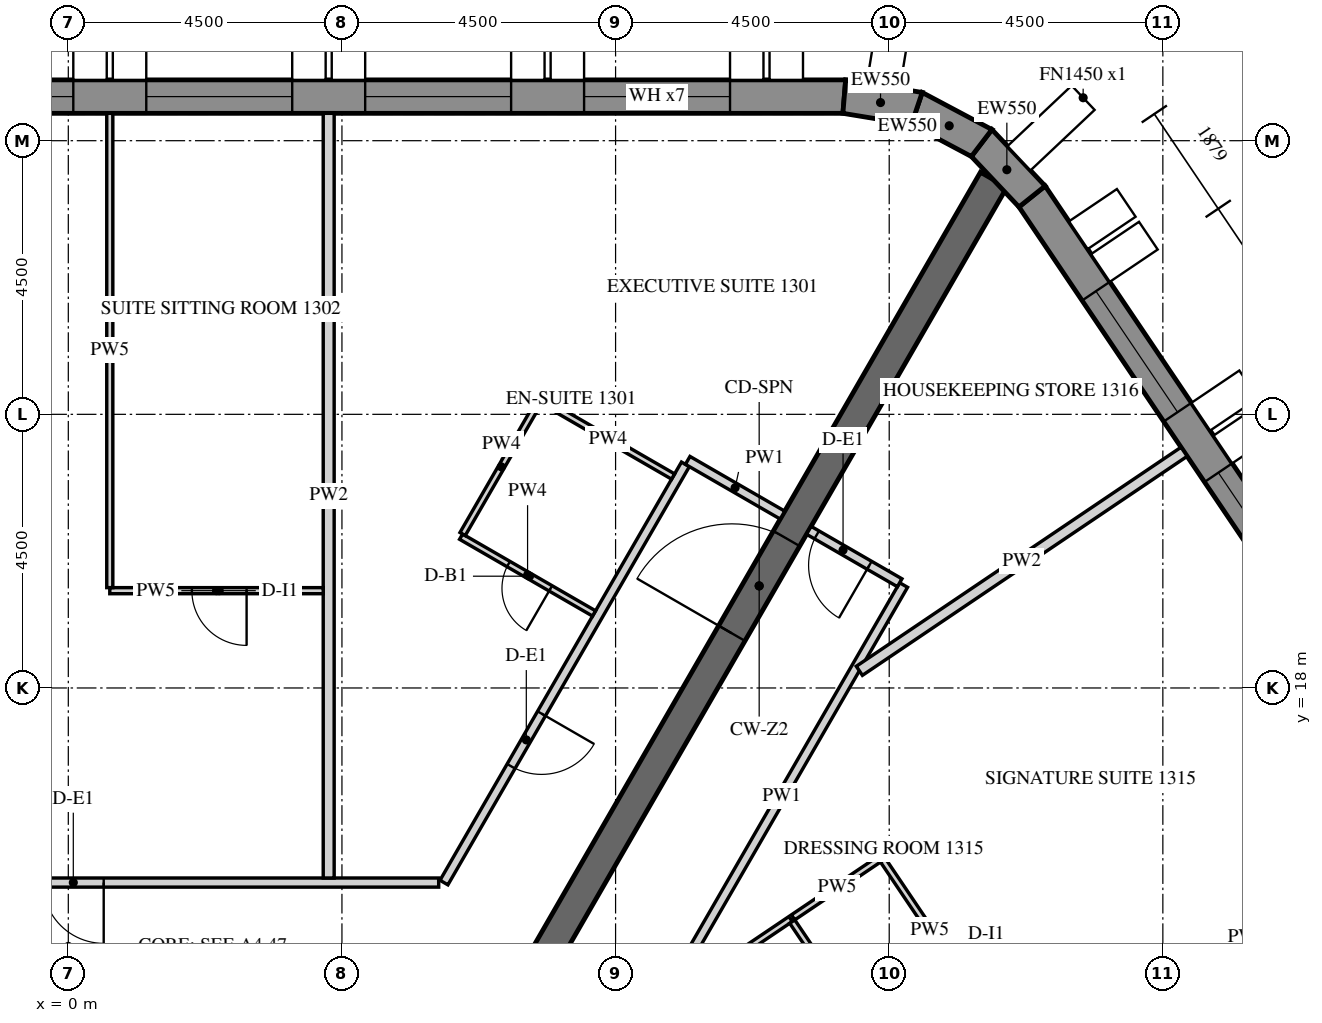
"""IFC4 building model, lengths in metres.
Left out: names, types, materials, properties, quantities, classifications, styles, units other than length and angle.
Written with IfcOpenShell. Run it as: python <this file> out.ifc"""

import sys

from ifc_helpers import new_model, si_unit, direction, frame, frame_2d, origin, place, context, subcontext, project, spatial, polyline, rectangle, outline, extrude, element, fill, save


model = new_model("IFC4")
c1 = context("Model", 3, precision=1e-05, world=origin(), true_north=direction((0.0, 1.0)))
c2 = subcontext(c1, "Body", "Model", "MODEL_VIEW")
j1 = project(units=[si_unit("LENGTHUNIT", "METRE"), si_unit("PLANEANGLEUNIT", "RADIAN")], contexts=[c1])
p1 = place(None, origin())
s1 = spatial("IfcSite", under=j1, at=p1, CompositionType="ELEMENT")
p2 = place(p1, origin())
s2 = spatial("IfcBuilding", under=s1, at=p2, CompositionType="ELEMENT")
p3 = place(p2, frame((0.0, 0.0, 176.1)))
s3 = spatial("IfcBuildingStorey", under=s2, at=p3, CompositionType="ELEMENT", Elevation=176.1)
p4 = place(p3, frame((12.761, 27.725, -0.15), z_axis=(0.0, 0.0, 1.0), x_axis=(-1.0, 0.0, 0.0)))
e1 = element("IfcWall", 1, at=p4, inside=s3, PredefinedType="SOLIDWALL", context=c2, shape_type="SweptSolid", body=[
    extrude(outline(polyline([(-0.022, -0.275), (27.783, -0.275), (27.732, 0.275), (0.022, 0.275), (-0.022, -0.275)])), origin(), (0.0, 0.0, 1.0), 3.9),
])
p5 = place(p4, frame((1.879, 0.0, 1.05)))
e2 = element("IfcOpeningElement", 2, at=p5, cuts=e1, PredefinedType="OPENING", context=c2, shape_type="SweptSolid", body=[
    extrude(rectangle(XDim=2.4, YDim=2.4, at=frame_2d((1.2, 1.2))), frame((0.0, 0.285, 0.0), z_axis=(0.0, -1.0, 0.0), x_axis=(1.0, 0.0, 0.0)), (0.0, 0.0, 1.0), 0.57),
])
p6 = place(p4, frame((5.479, 0.0, 1.05)))
e3 = element("IfcOpeningElement", 3, at=p6, cuts=e1, PredefinedType="OPENING", context=c2, shape_type="SweptSolid", body=[
    extrude(rectangle(XDim=2.4, YDim=2.4, at=frame_2d((1.2, 1.2))), frame((0.0, 0.285, 0.0), z_axis=(0.0, -1.0, 0.0), x_axis=(1.0, 0.0, 0.0)), (0.0, 0.0, 1.0), 0.57),
])
p7 = place(p4, frame((9.079, 0.0, 1.05)))
e4 = element("IfcOpeningElement", 4, at=p7, cuts=e1, PredefinedType="OPENING", context=c2, shape_type="SweptSolid", body=[
    extrude(rectangle(XDim=2.4, YDim=2.4, at=frame_2d((1.2, 1.2))), frame((0.0, 0.285, 0.0), z_axis=(0.0, -1.0, 0.0), x_axis=(1.0, 0.0, 0.0)), (0.0, 0.0, 1.0), 0.57),
])
p8 = place(p4, frame((12.679, 0.0, 1.05)))
e5 = element("IfcOpeningElement", 5, at=p8, cuts=e1, PredefinedType="OPENING", context=c2, shape_type="SweptSolid", body=[
    extrude(rectangle(XDim=2.4, YDim=2.4, at=frame_2d((1.2, 1.2))), frame((0.0, 0.285, 0.0), z_axis=(0.0, -1.0, 0.0), x_axis=(1.0, 0.0, 0.0)), (0.0, 0.0, 1.0), 0.57),
])
p9 = place(p4, frame((16.279, 0.0, 1.05)))
e6 = element("IfcOpeningElement", 6, at=p9, cuts=e1, PredefinedType="OPENING", context=c2, shape_type="SweptSolid", body=[
    extrude(rectangle(XDim=2.4, YDim=2.4, at=frame_2d((1.2, 1.2))), frame((0.0, 0.285, 0.0), z_axis=(0.0, -1.0, 0.0), x_axis=(1.0, 0.0, 0.0)), (0.0, 0.0, 1.0), 0.57),
])
p10 = place(p4, frame((19.879, 0.0, 1.05)))
e7 = element("IfcOpeningElement", 7, at=p10, cuts=e1, PredefinedType="OPENING", context=c2, shape_type="SweptSolid", body=[
    extrude(rectangle(XDim=2.4, YDim=2.4, at=frame_2d((1.2, 1.2))), frame((0.0, 0.285, 0.0), z_axis=(0.0, -1.0, 0.0), x_axis=(1.0, 0.0, 0.0)), (0.0, 0.0, 1.0), 0.57),
])
p11 = place(p4, frame((23.479, 0.0, 1.05)))
e8 = element("IfcOpeningElement", 8, at=p11, cuts=e1, PredefinedType="OPENING", context=c2, shape_type="SweptSolid", body=[
    extrude(rectangle(XDim=2.4, YDim=2.4, at=frame_2d((1.2, 1.2))), frame((0.0, 0.285, 0.0), z_axis=(0.0, -1.0, 0.0), x_axis=(1.0, 0.0, 0.0)), (0.0, 0.0, 1.0), 0.57),
])
p12 = place(p3, frame((31.371, 3.071, -0.15), z_axis=(0.0, 0.0, 1.0), x_axis=(-0.559189891278, 0.829039604297, 0.0)))
e9 = element("IfcWall", 9, at=p12, inside=s3, PredefinedType="SOLIDWALL", context=c2, shape_type="SweptSolid", body=[
    extrude(outline(polyline([(-0.026, -0.275), (27.781, -0.275), (27.736, 0.275), (0.026, 0.275), (-0.026, -0.275)])), origin(), (0.0, 0.0, 1.0), 3.9),
])
p13 = place(p12, frame((1.879, 0.0, 1.05)))
e10 = element("IfcOpeningElement", 10, at=p13, cuts=e9, PredefinedType="OPENING", context=c2, shape_type="SweptSolid", body=[
    extrude(rectangle(XDim=2.4, YDim=2.4, at=frame_2d((1.2, 1.2))), frame((0.0, 0.285, 0.0), z_axis=(0.0, -1.0, 0.0), x_axis=(1.0, 0.0, 0.0)), (0.0, 0.0, 1.0), 0.57),
])
p14 = place(p12, frame((5.479, 0.0, 1.05)))
e11 = element("IfcOpeningElement", 11, at=p14, cuts=e9, PredefinedType="OPENING", context=c2, shape_type="SweptSolid", body=[
    extrude(rectangle(XDim=2.4, YDim=2.4, at=frame_2d((1.2, 1.2))), frame((0.0, 0.285, 0.0), z_axis=(0.0, -1.0, 0.0), x_axis=(1.0, 0.0, 0.0)), (0.0, 0.0, 1.0), 0.57),
])
p15 = place(p12, frame((9.079, 0.0, 1.05)))
e12 = element("IfcOpeningElement", 12, at=p15, cuts=e9, PredefinedType="OPENING", context=c2, shape_type="SweptSolid", body=[
    extrude(rectangle(XDim=2.4, YDim=2.4, at=frame_2d((1.2, 1.2))), frame((0.0, 0.285, 0.0), z_axis=(0.0, -1.0, 0.0), x_axis=(1.0, 0.0, 0.0)), (0.0, 0.0, 1.0), 0.57),
])
p16 = place(p12, frame((12.679, 0.0, 1.05)))
e13 = element("IfcOpeningElement", 13, at=p16, cuts=e9, PredefinedType="OPENING", context=c2, shape_type="SweptSolid", body=[
    extrude(rectangle(XDim=2.4, YDim=2.4, at=frame_2d((1.2, 1.2))), frame((0.0, 0.285, 0.0), z_axis=(0.0, -1.0, 0.0), x_axis=(1.0, 0.0, 0.0)), (0.0, 0.0, 1.0), 0.57),
])
p17 = place(p12, frame((16.279, 0.0, 1.05)))
e14 = element("IfcOpeningElement", 14, at=p17, cuts=e9, PredefinedType="OPENING", context=c2, shape_type="SweptSolid", body=[
    extrude(rectangle(XDim=2.4, YDim=2.4, at=frame_2d((1.2, 1.2))), frame((0.0, 0.285, 0.0), z_axis=(0.0, -1.0, 0.0), x_axis=(1.0, 0.0, 0.0)), (0.0, 0.0, 1.0), 0.57),
])
p18 = place(p12, frame((19.879, 0.0, 1.05)))
e15 = element("IfcOpeningElement", 15, at=p18, cuts=e9, PredefinedType="OPENING", context=c2, shape_type="SweptSolid", body=[
    extrude(rectangle(XDim=2.4, YDim=2.4, at=frame_2d((1.2, 1.2))), frame((0.0, 0.285, 0.0), z_axis=(0.0, -1.0, 0.0), x_axis=(1.0, 0.0, 0.0)), (0.0, 0.0, 1.0), 0.57),
])
p19 = place(p12, frame((23.479, 0.0, 1.05)))
e16 = element("IfcOpeningElement", 16, at=p19, cuts=e9, PredefinedType="OPENING", context=c2, shape_type="SweptSolid", body=[
    extrude(rectangle(XDim=2.4, YDim=2.4, at=frame_2d((1.2, 1.2))), frame((0.0, 0.285, 0.0), z_axis=(0.0, -1.0, 0.0), x_axis=(1.0, 0.0, 0.0)), (0.0, 0.0, 1.0), 0.57),
])
p20 = place(p3, frame((15.849, 26.083, -0.15), z_axis=(0.0, 0.0, 1.0), x_axis=(-0.686196220404, 0.727416488061, 0.0)))
e17 = element("IfcWall", 17, at=p20, inside=s3, PredefinedType="SOLIDWALL", context=c2, shape_type="SweptSolid", body=[
    extrude(outline(polyline([(-0.022, -0.275), (1.253, -0.275), (1.163, 0.275), (0.022, 0.275), (-0.022, -0.275)])), origin(), (0.0, 0.0, 1.0), 3.9),
])
p21 = place(p3, frame((15.02, 26.962, -0.15), z_axis=(0.0, 0.0, 1.0), x_axis=(-0.882950818639, 0.469465495926, 0.0)))
e18 = element("IfcWall", 18, at=p21, inside=s3, PredefinedType="SOLIDWALL", context=c2, shape_type="SweptSolid", body=[
    extrude(outline(polyline([(-0.045, -0.275), (1.253, -0.275), (1.163, 0.275), (0.045, 0.275), (-0.045, -0.275)])), origin(), (0.0, 0.0, 1.0), 3.9),
])
p22 = place(p3, frame((13.953, 27.529, -0.15), z_axis=(0.0, 0.0, 1.0), x_axis=(-0.986751945211, 0.162236243244, 0.0)))
e19 = element("IfcWall", 19, at=p22, inside=s3, PredefinedType="SOLIDWALL", context=c2, shape_type="SweptSolid", body=[
    extrude(outline(polyline([(-0.045, -0.275), (1.231, -0.275), (1.186, 0.275), (0.045, 0.275), (-0.045, -0.275)])), origin(), (0.0, 0.0, 1.0), 3.9),
])
p23 = place(p3, frame((7.506, 13.0, -0.15), z_axis=(0.0, 0.0, 1.0), x_axis=(0.499988271576, 0.866032175087, 0.0)))
e20 = element("IfcWall", 20, at=p23, inside=s3, PredefinedType="SHEAR", context=c2, shape_type="SweptSolid", body=[
    extrude(rectangle(XDim=15.424, YDim=0.5, at=frame_2d((7.712, 0.0))), origin(), (0.0, 0.0, 1.0), 3.9),
])
p24 = place(p23, frame((6.812, 0.0, 0.15)))
e21 = element("IfcOpeningElement", 21, at=p24, cuts=e20, PredefinedType="OPENING", context=c2, shape_type="SweptSolid", body=[
    extrude(rectangle(XDim=1.8, YDim=2.4, at=frame_2d((0.9, 1.2))), frame((0.0, 0.26, 0.0), z_axis=(0.0, -1.0, 0.0), x_axis=(1.0, 0.0, 0.0)), (0.0, 0.0, 1.0), 0.52),
])
p25 = place(p3, frame((10.149, 21.678, 0.0), z_axis=(0.0, 0.0, 1.0), x_axis=(-0.499997422768, -0.866026891745, 0.0)))
e22 = element("IfcWall", 22, at=p25, inside=s3, PredefinedType="PARTITIONING", context=c2, shape_type="SweptSolid", body=[
    extrude(rectangle(XDim=7.942, YDim=0.15, at=frame_2d((3.971, 0.0))), origin(), (0.0, 0.0, 1.0), 2.988),
])
p26 = place(p25, frame((4.733, 0.0, 0.0)))
e23 = element("IfcOpeningElement", 23, at=p26, cuts=e22, PredefinedType="OPENING", context=c2, shape_type="SweptSolid", body=[
    extrude(rectangle(XDim=1.0, YDim=2.1, at=frame_2d((0.5, 1.05))), frame((0.0, 0.085, 0.0), z_axis=(0.0, -1.0, 0.0), x_axis=(1.0, 0.0, 0.0)), (0.0, 0.0, 1.0), 0.17),
])
p27 = place(p3, frame((6.091, 14.8, 0.0), z_axis=(0.0, 0.0, 1.0), x_axis=(-1.0, 0.0, 0.0)))
e24 = element("IfcWall", 24, at=p27, inside=s3, PredefinedType="PARTITIONING", context=c2, shape_type="SweptSolid", body=[
    extrude(rectangle(XDim=14.636, YDim=0.15, at=frame_2d((7.318, 0.0))), origin(), (0.0, 0.0, 1.0), 2.988),
])
p28 = place(p27, frame((5.509, 0.0, 0.0)))
e25 = element("IfcOpeningElement", 25, at=p28, cuts=e24, PredefinedType="OPENING", context=c2, shape_type="SweptSolid", body=[
    extrude(rectangle(XDim=1.0, YDim=2.1, at=frame_2d((0.5, 1.05))), frame((0.0, 0.085, 0.0), z_axis=(0.0, -1.0, 0.0), x_axis=(1.0, 0.0, 0.0)), (0.0, 0.0, 1.0), 0.17),
])
p29 = place(p3, frame((11.745, 20.843, 0.0), z_axis=(0.0, 0.0, 1.0), x_axis=(-0.865989075817, 0.500062916607, 0.0)))
e26 = element("IfcWall", 26, at=p29, inside=s3, PredefinedType="PARTITIONING", context=c2, shape_type="SweptSolid", body=[
    extrude(rectangle(XDim=1.8, YDim=0.15, at=frame_2d((0.9, 0.0))), origin(), (0.0, 0.0, 1.0), 2.988),
])
p30 = place(p3, frame((9.728, 12.75, 0.0), z_axis=(0.0, 0.0, 1.0), x_axis=(0.500007149838, 0.866021275784, 0.0)))
e27 = element("IfcWall", 27, at=p30, inside=s3, PredefinedType="PARTITIONING", context=c2, shape_type="SweptSolid", body=[
    extrude(rectangle(XDim=8.017, YDim=0.15, at=frame_2d((4.009, 0.0))), origin(), (0.0, 0.0, 1.0), 2.988),
])
p31 = place(p3, frame((13.672, 19.73, 0.0), z_axis=(0.0, 0.0, 1.0), x_axis=(-0.866074815912, 0.499914405916, 0.0)))
e28 = element("IfcWall", 28, at=p31, inside=s3, PredefinedType="PARTITIONING", context=c2, shape_type="SweptSolid", body=[
    extrude(rectangle(XDim=1.725, YDim=0.15, at=frame_2d((0.862, 0.0))), origin(), (0.0, 0.0, 1.0), 2.988),
])
p32 = place(p31, frame((0.575, 0.0, 0.0)))
e29 = element("IfcOpeningElement", 29, at=p32, cuts=e28, PredefinedType="OPENING", context=c2, shape_type="SweptSolid", body=[
    extrude(rectangle(XDim=1.0, YDim=2.1, at=frame_2d((0.5, 1.05))), frame((0.0, 0.085, 0.0), z_axis=(0.0, -1.0, 0.0), x_axis=(1.0, 0.0, 0.0)), (0.0, 0.0, 1.0), 0.17),
])
p33 = place(p3, frame((8.646, 19.226, 0.0), z_axis=(0.0, 0.0, 1.0), x_axis=(-0.866039067339, 0.499976333282, 0.0)))
e30 = element("IfcWall", 30, at=p33, inside=s3, PredefinedType="PARTITIONING", context=c2, shape_type="SweptSolid", body=[
    extrude(rectangle(XDim=2.525, YDim=0.1, at=frame_2d((1.262, 0.0))), origin(), (0.0, 0.0, 1.0), 2.988),
])
p34 = place(p33, frame((0.825, 0.0, 0.0)))
e31 = element("IfcOpeningElement", 31, at=p34, cuts=e30, PredefinedType="OPENING", context=c2, shape_type="SweptSolid", body=[
    extrude(rectangle(XDim=0.8, YDim=2.1, at=frame_2d((0.4, 1.05))), frame((0.0, 0.06, 0.0), z_axis=(0.0, -1.0, 0.0), x_axis=(1.0, 0.0, 0.0)), (0.0, 0.0, 1.0), 0.12),
])
p35 = place(p3, frame((6.484, 20.531, 0.0), z_axis=(0.0, 0.0, 1.0), x_axis=(0.500062241894, 0.865989465428, 0.0)))
e32 = element("IfcWall", 32, at=p35, inside=s3, PredefinedType="PARTITIONING", context=c2, shape_type="SweptSolid", body=[
    extrude(rectangle(XDim=2.55, YDim=0.1, at=frame_2d((1.275, 0.0))), origin(), (0.0, 0.0, 1.0), 2.988),
])
p36 = place(p3, frame((7.803, 22.715, 0.0), z_axis=(0.0, 0.0, 1.0), x_axis=(0.866006523861, -0.500032699561, 0.0)))
e33 = element("IfcWall", 33, at=p36, inside=s3, PredefinedType="PARTITIONING", context=c2, shape_type="SweptSolid", body=[
    extrude(rectangle(XDim=2.475, YDim=0.1, at=frame_2d((1.237, 0.0))), origin(), (0.0, 0.0, 1.0), 2.988),
])
p37 = place(p3, frame((4.282, 27.45, 0.0), z_axis=(0.0, 0.0, 1.0), x_axis=(0.0, -1.0, 0.0)))
e34 = element("IfcWall", 34, at=p37, inside=s3, PredefinedType="PARTITIONING", context=c2, shape_type="SweptSolid", body=[
    extrude(rectangle(XDim=12.575, YDim=0.18, at=frame_2d((6.288, 0.0))), origin(), (0.0, 0.0, 1.0), 2.988),
])
p38 = place(p3, frame((4.192, 19.6, 0.0), z_axis=(0.0, 0.0, 1.0), x_axis=(-1.0, 0.0, 0.0)))
e35 = element("IfcWall", 35, at=p38, inside=s3, PredefinedType="PARTITIONING", context=c2, shape_type="SweptSolid", body=[
    extrude(rectangle(XDim=3.51, YDim=0.1, at=frame_2d((1.755, 0.0))), origin(), (0.0, 0.0, 1.0), 2.988),
])
p39 = place(p38, frame((1.26, 0.0, 0.0)))
e36 = element("IfcOpeningElement", 36, at=p39, cuts=e35, PredefinedType="OPENING", context=c2, shape_type="SweptSolid", body=[
    extrude(rectangle(XDim=0.9, YDim=2.1, at=frame_2d((0.45, 1.05))), frame((0.0, 0.06, 0.0), z_axis=(0.0, -1.0, 0.0), x_axis=(1.0, 0.0, 0.0)), (0.0, 0.0, 1.0), 0.12),
])
p40 = place(p3, frame((0.682, 19.65, 0.0), z_axis=(0.0, 0.0, 1.0), x_axis=(0.0, 1.0, 0.0)))
e37 = element("IfcWall", 37, at=p40, inside=s3, PredefinedType="PARTITIONING", context=c2, shape_type="SweptSolid", body=[
    extrude(rectangle(XDim=7.8, YDim=0.1, at=frame_2d((3.9, 0.0))), origin(), (0.0, 0.0, 1.0), 2.988),
])
p41 = place(p3, frame((9.87, 12.846, 0.0), z_axis=(0.0, 0.0, 1.0), x_axis=(0.829044958406, 0.559181953341, 0.0)))
e38 = element("IfcWall", 38, at=p41, inside=s3, PredefinedType="PARTITIONING", context=c2, shape_type="SweptSolid", body=[
    extrude(rectangle(XDim=2.422, YDim=0.1, at=frame_2d((1.211, 0.0))), origin(), (0.0, 0.0, 1.0), 2.988),
])
p42 = place(p3, frame((11.919, 14.228, 0.0), z_axis=(0.0, 0.0, 1.0), x_axis=(0.829076640662, 0.559134978256, 0.0)))
e39 = element("IfcWall", 39, at=p42, inside=s3, PredefinedType="PARTITIONING", context=c2, shape_type="SweptSolid", body=[
    extrude(rectangle(XDim=1.75, YDim=0.1, at=frame_2d((0.875, 0.0))), origin(), (0.0, 0.0, 1.0), 2.988),
])
p43 = place(p3, frame((13.398, 15.165, 0.0), z_axis=(0.0, 0.0, 1.0), x_axis=(0.559178562802, -0.829047245278, 0.0)))
e40 = element("IfcWall", 40, at=p43, inside=s3, PredefinedType="PARTITIONING", context=c2, shape_type="SweptSolid", body=[
    extrude(rectangle(XDim=2.75, YDim=0.1, at=frame_2d((1.375, 0.0))), origin(), (0.0, 0.0, 1.0), 2.988),
])
p44 = place(p3, frame((16.396, 11.882, 0.0), z_axis=(0.0, 0.0, 1.0), x_axis=(0.829038554805, 0.559191447223, 0.0)))
e41 = element("IfcWall", 41, at=p44, inside=s3, PredefinedType="PARTITIONING", context=c2, shape_type="SweptSolid", body=[
    extrude(rectangle(XDim=7.213, YDim=0.1, at=frame_2d((3.606, 0.0))), origin(), (0.0, 0.0, 1.0), 2.988),
])
p45 = place(p3, frame((18.35, 21.884, 0.0), z_axis=(0.0, 0.0, 1.0), x_axis=(-0.829047205772, -0.559178621374, 0.0)))
e42 = element("IfcWall", 42, at=p45, inside=s3, PredefinedType="PARTITIONING", context=c2, shape_type="SweptSolid", body=[
    extrude(rectangle(XDim=6.442, YDim=0.18, at=frame_2d((3.221, 0.0))), origin(), (0.0, 0.0, 1.0), 2.988),
])
p46 = place(p3, frame((13.416, 11.92, 0.0), z_axis=(0.0, 0.0, 1.0), x_axis=(-0.559157567313, 0.829061405999, 0.0)))
e43 = element("IfcWall", 43, at=p46, inside=s3, PredefinedType="PARTITIONING", context=c2, shape_type="SweptSolid", body=[
    extrude(rectangle(XDim=2.7, YDim=0.1, at=frame_2d((1.35, 0.0))), origin(), (0.0, 0.0, 1.0), 2.988),
])
p47 = place(p5, frame((0.0, 0.205, 0.0)))
e44 = element("IfcWindow", 44, at=p47, inside=s3, PartitioningType="DOUBLE_PANEL_VERTICAL", PredefinedType="WINDOW", context=c2, shape_type="SweptSolid", body=[
    extrude(rectangle(XDim=2.4, YDim=2.4, at=frame_2d((1.2, 1.2))), frame((0.0, 0.03, 0.0), z_axis=(0.0, -1.0, 0.0), x_axis=(1.0, 0.0, 0.0)), (0.0, 0.0, 1.0), 0.06),
])
fill(e2, e44)
p48 = place(p6, frame((0.0, 0.205, 0.0)))
e45 = element("IfcWindow", 45, at=p48, inside=s3, PartitioningType="DOUBLE_PANEL_VERTICAL", PredefinedType="WINDOW", context=c2, shape_type="SweptSolid", body=[
    extrude(rectangle(XDim=2.4, YDim=2.4, at=frame_2d((1.2, 1.2))), frame((0.0, 0.03, 0.0), z_axis=(0.0, -1.0, 0.0), x_axis=(1.0, 0.0, 0.0)), (0.0, 0.0, 1.0), 0.06),
])
fill(e3, e45)
p49 = place(p7, frame((0.0, 0.205, 0.0)))
e46 = element("IfcWindow", 46, at=p49, inside=s3, PartitioningType="DOUBLE_PANEL_VERTICAL", PredefinedType="WINDOW", context=c2, shape_type="SweptSolid", body=[
    extrude(rectangle(XDim=2.4, YDim=2.4, at=frame_2d((1.2, 1.2))), frame((0.0, 0.03, 0.0), z_axis=(0.0, -1.0, 0.0), x_axis=(1.0, 0.0, 0.0)), (0.0, 0.0, 1.0), 0.06),
])
fill(e4, e46)
p50 = place(p8, frame((0.0, 0.205, 0.0)))
e47 = element("IfcWindow", 47, at=p50, inside=s3, PartitioningType="DOUBLE_PANEL_VERTICAL", PredefinedType="WINDOW", context=c2, shape_type="SweptSolid", body=[
    extrude(rectangle(XDim=2.4, YDim=2.4, at=frame_2d((1.2, 1.2))), frame((0.0, 0.03, 0.0), z_axis=(0.0, -1.0, 0.0), x_axis=(1.0, 0.0, 0.0)), (0.0, 0.0, 1.0), 0.06),
])
fill(e5, e47)
p51 = place(p18, frame((0.0, 0.205, 0.0)))
e48 = element("IfcWindow", 48, at=p51, inside=s3, PartitioningType="DOUBLE_PANEL_VERTICAL", PredefinedType="WINDOW", context=c2, shape_type="SweptSolid", body=[
    extrude(rectangle(XDim=2.4, YDim=2.4, at=frame_2d((1.2, 1.2))), frame((0.0, 0.03, 0.0), z_axis=(0.0, -1.0, 0.0), x_axis=(1.0, 0.0, 0.0)), (0.0, 0.0, 1.0), 0.06),
])
fill(e15, e48)
p52 = place(p19, frame((0.0, 0.205, 0.0)))
e49 = element("IfcWindow", 49, at=p52, inside=s3, PartitioningType="DOUBLE_PANEL_VERTICAL", PredefinedType="WINDOW", context=c2, shape_type="SweptSolid", body=[
    extrude(rectangle(XDim=2.4, YDim=2.4, at=frame_2d((1.2, 1.2))), frame((0.0, 0.03, 0.0), z_axis=(0.0, -1.0, 0.0), x_axis=(1.0, 0.0, 0.0)), (0.0, 0.0, 1.0), 0.06),
])
fill(e16, e49)
p53 = place(p24, origin())
e50 = element("IfcDoor", 50, at=p53, inside=s3, OperationType="DOUBLE_DOOR_SINGLE_SWING", PredefinedType="DOOR", context=c2, shape_type="SweptSolid", body=[
    extrude(rectangle(XDim=1.8, YDim=2.4, at=frame_2d((0.9, 1.2))), frame((0.0, 0.025, 0.0), z_axis=(0.0, -1.0, 0.0), x_axis=(1.0, 0.0, 0.0)), (0.0, 0.0, 1.0), 0.05),
])
fill(e21, e50)
p54 = place(p26, origin())
e51 = element("IfcDoor", 51, at=p54, inside=s3, OperationType="SINGLE_SWING_LEFT", PredefinedType="DOOR", context=c2, shape_type="SweptSolid", body=[
    extrude(rectangle(XDim=1.0, YDim=2.1, at=frame_2d((0.5, 1.05))), frame((0.0, 0.025, 0.0), z_axis=(0.0, -1.0, 0.0), x_axis=(1.0, 0.0, 0.0)), (0.0, 0.0, 1.0), 0.05),
])
fill(e23, e51)
p55 = place(p34, origin())
e52 = element("IfcDoor", 52, at=p55, inside=s3, OperationType="SINGLE_SWING_RIGHT", PredefinedType="DOOR", context=c2, shape_type="SweptSolid", body=[
    extrude(rectangle(XDim=0.8, YDim=2.1, at=frame_2d((0.4, 1.05))), frame((0.0, 0.025, 0.0), z_axis=(0.0, -1.0, 0.0), x_axis=(1.0, 0.0, 0.0)), (0.0, 0.0, 1.0), 0.05),
])
fill(e31, e52)
p56 = place(p28, origin())
e53 = element("IfcDoor", 53, at=p56, inside=s3, OperationType="SINGLE_SWING_RIGHT", PredefinedType="DOOR", context=c2, shape_type="SweptSolid", body=[
    extrude(rectangle(XDim=1.0, YDim=2.1, at=frame_2d((0.5, 1.05))), frame((0.0, 0.025, 0.0), z_axis=(0.0, -1.0, 0.0), x_axis=(1.0, 0.0, 0.0)), (0.0, 0.0, 1.0), 0.05),
])
fill(e25, e53)
p57 = place(p39, origin())
e54 = element("IfcDoor", 54, at=p57, inside=s3, OperationType="SINGLE_SWING_RIGHT", PredefinedType="DOOR", context=c2, shape_type="SweptSolid", body=[
    extrude(rectangle(XDim=0.9, YDim=2.1, at=frame_2d((0.45, 1.05))), frame((0.0, 0.025, 0.0), z_axis=(0.0, -1.0, 0.0), x_axis=(1.0, 0.0, 0.0)), (0.0, 0.0, 1.0), 0.05),
])
fill(e36, e54)
p58 = place(p32, origin())
e55 = element("IfcDoor", 55, at=p58, inside=s3, OperationType="SINGLE_SWING_LEFT", PredefinedType="DOOR", context=c2, shape_type="SweptSolid", body=[
    extrude(rectangle(XDim=1.0, YDim=2.1, at=frame_2d((0.5, 1.05))), frame((0.0, 0.025, 0.0), z_axis=(0.0, -1.0, 0.0), x_axis=(1.0, 0.0, 0.0)), (0.0, 0.0, 1.0), 0.05),
])
fill(e29, e55)
save(model, sys.argv[1])
